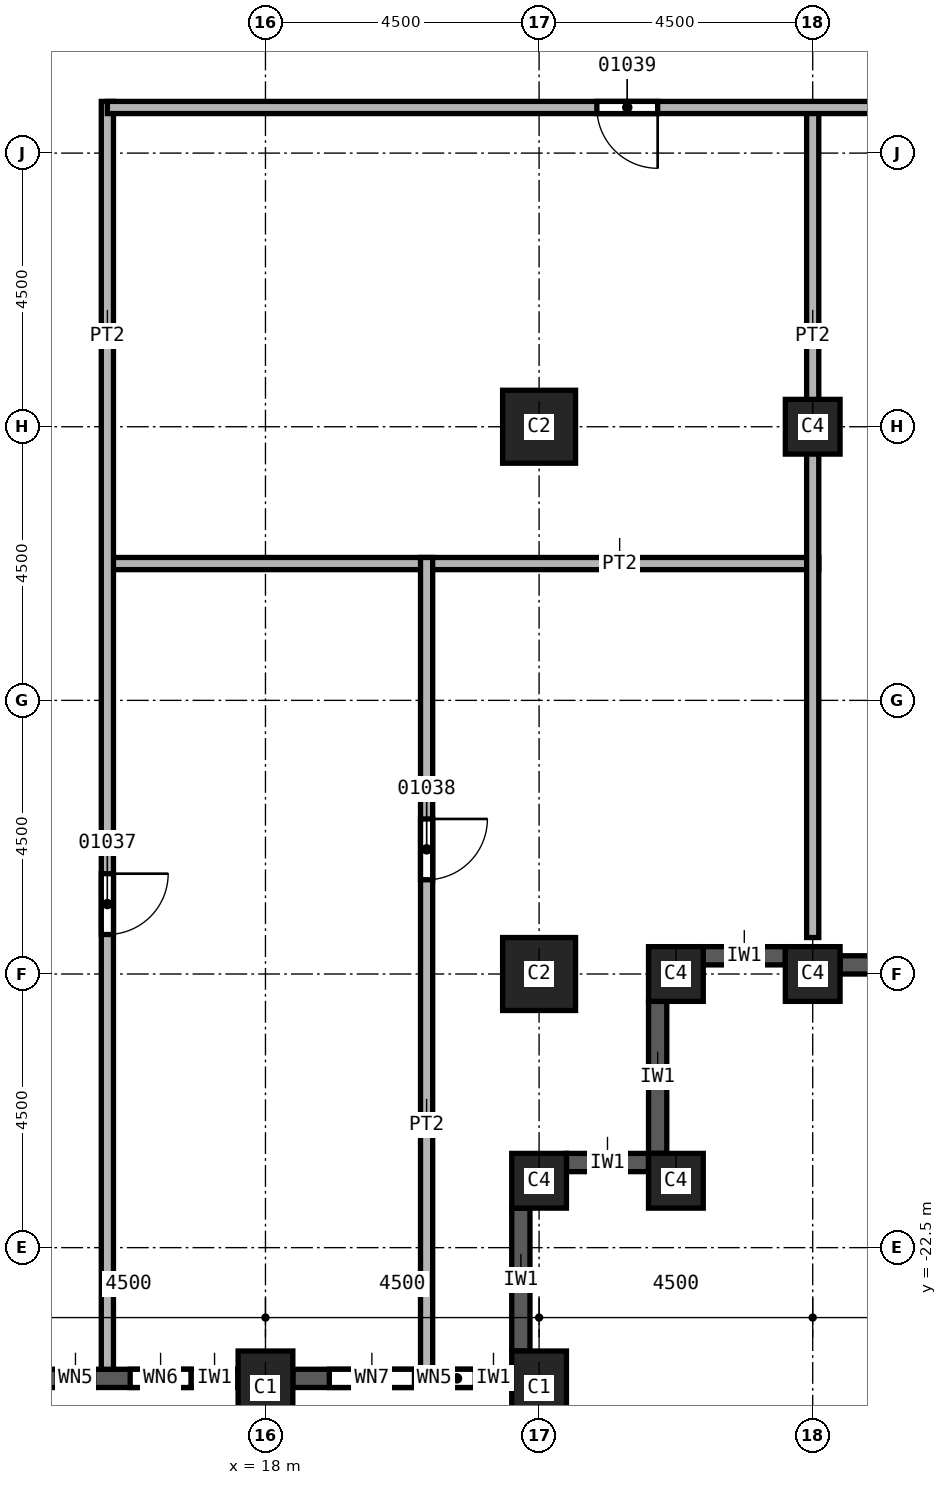
"""IFC4 building model, lengths in metres.
Left out: names, types, materials, properties, quantities, classifications, styles, units other than length and angle.
Written with IfcOpenShell. Run it as: python <this file> out.ifc"""

import sys

from ifc_helpers import new_model, si_unit, direction, frame, frame_2d, origin, origin_2d, place, context, subcontext, project, spatial, rectangle, extrude, element, fill, save


model = new_model("IFC4")
c1 = context("Model", 3, precision=1e-05, world=origin(), true_north=direction((0.0, 1.0)))
c2 = subcontext(c1, "Body", "Model", "MODEL_VIEW")
j1 = project(units=[si_unit("LENGTHUNIT", "METRE"), si_unit("PLANEANGLEUNIT", "RADIAN")], contexts=[c1])
p1 = place(None, origin())
s1 = spatial("IfcSite", under=j1, at=p1, CompositionType="ELEMENT")
p2 = place(p1, origin())
s2 = spatial("IfcBuilding", under=s1, at=p2, CompositionType="ELEMENT")
p3 = place(p2, frame((0.0, 0.0, 72.0)))
s3 = spatial("IfcBuildingStorey", under=s2, at=p3, CompositionType="ELEMENT", Elevation=72.0)
for number, where, z_axis, x_axis in (
    (1, (22.5, -9.0, 0.0), (0.0, 0.0, 1.0), (1.0, 0.0, 0.0)),
    (2, (22.5, -18.0, 0.0), (0.0, 0.0, 1.0), (1.0, 0.0, 0.0)),
):
    element("IfcColumn", number, at=place(p3, frame(where, z_axis=z_axis, x_axis=x_axis)), inside=s3, PredefinedType="COLUMN", context=c2, shape_type="SweptSolid", body=[
        extrude(rectangle(XDim=1.2, YDim=1.2, at=origin_2d()), origin(), (0.0, 0.0, 1.0), 3.7),
    ])
for number, where, z_axis, x_axis in (
    (3, (27.0, -9.0, 0.0), (0.0, 0.0, 1.0), (1.0, 0.0, 0.0)),
    (4, (27.0, -18.0, 0.0), (0.0, 0.0, 1.0), (1.0, 0.0, 0.0)),
):
    element("IfcColumn", number, at=place(p3, frame(where, z_axis=z_axis, x_axis=x_axis)), inside=s3, PredefinedType="COLUMN", context=c2, shape_type="SweptSolid", body=[
        extrude(rectangle(XDim=0.9, YDim=0.9, at=origin_2d()), origin(), (0.0, 0.0, 1.0), 3.7),
    ])
for number, where, z_axis, x_axis in (
    (5, (18.0, -24.8, 0.0), (0.0, 0.0, 1.0), (1.0, 0.0, 0.0)),
    (6, (22.5, -24.8, 0.0), (0.0, 0.0, 1.0), (1.0, 0.0, 0.0)),
):
    element("IfcColumn", number, at=place(p3, frame(where, z_axis=z_axis, x_axis=x_axis)), inside=s3, PredefinedType="COLUMN", context=c2, shape_type="SweptSolid", body=[
        extrude(rectangle(XDim=0.9, YDim=1.2, at=origin_2d()), origin(), (0.0, 0.0, 1.0), 3.7),
    ])
for number, where, z_axis, x_axis in (
    (7, (22.5, -21.4, 0.0), (0.0, 0.0, 1.0), (1.0, 0.0, 0.0)),
    (8, (24.75, -21.4, 0.0), (0.0, 0.0, 1.0), (1.0, 0.0, 0.0)),
    (9, (24.75, -18.0, 0.0), (0.0, 0.0, 1.0), (1.0, 0.0, 0.0)),
):
    element("IfcColumn", number, at=place(p3, frame(where, z_axis=z_axis, x_axis=x_axis)), inside=s3, PredefinedType="COLUMN", context=c2, shape_type="SweptSolid", body=[
        extrude(rectangle(XDim=0.9, YDim=0.9, at=origin_2d()), origin(), (0.0, 0.0, 1.0), 3.7),
    ])
p4 = place(p3, frame((13.95, -24.65, 0.0), z_axis=(0.0, 0.0, 1.0), x_axis=(1.0, 0.0, 0.0)))
e10 = element("IfcWall", 10, at=p4, inside=s3, PredefinedType="SOLIDWALL", context=c2, shape_type="SweptSolid", body=[
    extrude(rectangle(XDim=3.6, YDim=0.3, at=frame_2d((1.8, 0.0))), origin(), (0.0, 0.0, 1.0), 3.1),
])
p5 = place(p4, frame((0.625, 0.0, 0.8)))
e11 = element("IfcOpeningElement", 11, at=p5, cuts=e10, PredefinedType="OPENING", context=c2, shape_type="SweptSolid", body=[
    extrude(rectangle(XDim=0.6, YDim=1.95, at=frame_2d((0.3, 0.975))), frame((0.0, 0.15, 0.0), z_axis=(0.0, -1.0, 0.0), x_axis=(1.0, 0.0, 0.0)), (0.0, 0.0, 1.0), 0.3),
])
p6 = place(p4, frame((1.825, 0.0, 0.8)))
e12 = element("IfcOpeningElement", 12, at=p6, cuts=e10, PredefinedType="OPENING", context=c2, shape_type="SweptSolid", body=[
    extrude(rectangle(XDim=1.0, YDim=1.95, at=frame_2d((0.5, 0.975))), frame((0.0, 0.15, 0.0), z_axis=(0.0, -1.0, 0.0), x_axis=(1.0, 0.0, 0.0)), (0.0, 0.0, 1.0), 0.3),
])
p7 = place(p3, frame((18.45, -24.65, 0.0), z_axis=(0.0, 0.0, 1.0), x_axis=(1.0, 0.0, 0.0)))
e13 = element("IfcWall", 13, at=p7, inside=s3, PredefinedType="SOLIDWALL", context=c2, shape_type="SweptSolid", body=[
    extrude(rectangle(XDim=3.6, YDim=0.3, at=frame_2d((1.8, 0.0))), origin(), (0.0, 0.0, 1.0), 3.1),
])
p8 = place(p7, frame((0.6, 0.0, 0.8)))
e14 = element("IfcOpeningElement", 14, at=p8, cuts=e13, PredefinedType="OPENING", context=c2, shape_type="SweptSolid", body=[
    extrude(rectangle(XDim=1.4, YDim=1.95, at=frame_2d((0.7, 0.975))), frame((0.0, 0.15, 0.0), z_axis=(0.0, -1.0, 0.0), x_axis=(1.0, 0.0, 0.0)), (0.0, 0.0, 1.0), 0.3),
])
p9 = place(p7, frame((2.4, 0.0, 0.8)))
e15 = element("IfcOpeningElement", 15, at=p9, cuts=e13, PredefinedType="OPENING", context=c2, shape_type="SweptSolid", body=[
    extrude(rectangle(XDim=0.6, YDim=1.95, at=frame_2d((0.3, 0.975))), frame((0.0, 0.15, 0.0), z_axis=(0.0, -1.0, 0.0), x_axis=(1.0, 0.0, 0.0)), (0.0, 0.0, 1.0), 0.3),
])
p10 = place(p3, frame((22.2, -24.2, 0.0), z_axis=(0.0, 0.0, 1.0), x_axis=(0.0, 1.0, 0.0)))
e16 = element("IfcWall", 16, at=p10, inside=s3, PredefinedType="SOLIDWALL", context=c2, shape_type="SweptSolid", body=[
    extrude(rectangle(XDim=2.35, YDim=0.3, at=frame_2d((1.175, 0.0))), origin(), (0.0, 0.0, 1.0), 3.1),
])
p11 = place(p3, frame((22.95, -21.1, 0.0), z_axis=(0.0, 0.0, 1.0), x_axis=(1.0, 0.0, 0.0)))
e17 = element("IfcWall", 17, at=p11, inside=s3, PredefinedType="SOLIDWALL", context=c2, shape_type="SweptSolid", body=[
    extrude(rectangle(XDim=1.35, YDim=0.3, at=frame_2d((0.675, 0.0))), origin(), (0.0, 0.0, 1.0), 3.1),
])
p12 = place(p3, frame((24.45, -20.95, 0.0), z_axis=(0.0, 0.0, 1.0), x_axis=(0.0, 1.0, 0.0)))
e18 = element("IfcWall", 18, at=p12, inside=s3, PredefinedType="SOLIDWALL", context=c2, shape_type="SweptSolid", body=[
    extrude(rectangle(XDim=2.5, YDim=0.3, at=frame_2d((1.25, 0.0))), origin(), (0.0, 0.0, 1.0), 3.1),
])
p13 = place(p3, frame((25.2, -17.7, 0.0), z_axis=(0.0, 0.0, 1.0), x_axis=(1.0, 0.0, 0.0)))
e19 = element("IfcWall", 19, at=p13, inside=s3, PredefinedType="SOLIDWALL", context=c2, shape_type="SweptSolid", body=[
    extrude(rectangle(XDim=1.35, YDim=0.3, at=frame_2d((0.675, 0.0))), origin(), (0.0, 0.0, 1.0), 3.1),
])
p14 = place(p3, frame((27.45, -17.85, 0.0), z_axis=(0.0, 0.0, 1.0), x_axis=(1.0, 0.0, 0.0)))
e20 = element("IfcWall", 20, at=p14, inside=s3, PredefinedType="SOLIDWALL", context=c2, shape_type="SweptSolid", body=[
    extrude(rectangle(XDim=3.6, YDim=0.3, at=frame_2d((1.8, 0.0))), origin(), (0.0, 0.0, 1.0), 3.1),
])
p15 = place(p14, frame((0.6, 0.0, 0.8)))
e21 = element("IfcOpeningElement", 21, at=p15, cuts=e20, PredefinedType="OPENING", context=c2, shape_type="SweptSolid", body=[
    extrude(rectangle(XDim=2.4, YDim=1.95, at=frame_2d((1.2, 0.975))), frame((0.0, 0.15, 0.0), z_axis=(0.0, -1.0, 0.0), x_axis=(1.0, 0.0, 0.0)), (0.0, 0.0, 1.0), 0.3),
])
p16 = place(p3, frame((15.4, -11.25, 0.0), z_axis=(0.0, 0.0, 1.0), x_axis=(1.0, 0.0, 0.0)))
e22 = element("IfcWall", 22, at=p16, inside=s3, PredefinedType="PARTITIONING", context=c2, shape_type="SweptSolid", body=[
    extrude(rectangle(XDim=11.7, YDim=0.2, at=frame_2d((5.85, 0.0))), origin(), (0.0, 0.0, 1.0), 3.7),
])
p17 = place(p3, frame((15.4, -3.65, 0.0), z_axis=(0.0, 0.0, 1.0), x_axis=(0.0, -1.0, 0.0)))
e23 = element("IfcWall", 23, at=p17, inside=s3, PredefinedType="PARTITIONING", context=c2, shape_type="SweptSolid", body=[
    extrude(rectangle(XDim=20.85, YDim=0.2, at=frame_2d((10.425, 0.0))), origin(), (0.0, 0.0, 1.0), 3.7),
])
p18 = place(p17, frame((12.7, 0.0, 0.0)))
e24 = element("IfcOpeningElement", 24, at=p18, cuts=e23, PredefinedType="OPENING", context=c2, shape_type="SweptSolid", body=[
    extrude(rectangle(XDim=1.0, YDim=2.1, at=frame_2d((0.5, 1.05))), frame((0.0, 0.1, 0.0), z_axis=(0.0, -1.0, 0.0), x_axis=(1.0, 0.0, 0.0)), (0.0, 0.0, 1.0), 0.2),
])
p19 = place(p3, frame((20.65, -11.15, 0.0), z_axis=(0.0, 0.0, 1.0), x_axis=(0.0, -1.0, 0.0)))
e25 = element("IfcWall", 25, at=p19, inside=s3, PredefinedType="PARTITIONING", context=c2, shape_type="SweptSolid", body=[
    extrude(rectangle(XDim=13.35, YDim=0.2, at=frame_2d((6.675, 0.0))), origin(), (0.0, 0.0, 1.0), 3.7),
])
p20 = place(p19, frame((4.3, 0.0, 0.0)))
e26 = element("IfcOpeningElement", 26, at=p20, cuts=e25, PredefinedType="OPENING", context=c2, shape_type="SweptSolid", body=[
    extrude(rectangle(XDim=1.0, YDim=2.1, at=frame_2d((0.5, 1.05))), frame((0.0, 0.1, 0.0), z_axis=(0.0, -1.0, 0.0), x_axis=(1.0, 0.0, 0.0)), (0.0, 0.0, 1.0), 0.2),
])
p21 = place(p3, frame((27.0, -3.75, 0.0), z_axis=(0.0, 0.0, 1.0), x_axis=(0.0, -1.0, 0.0)))
e27 = element("IfcWall", 27, at=p21, inside=s3, PredefinedType="PARTITIONING", context=c2, shape_type="SweptSolid", body=[
    extrude(rectangle(XDim=13.65, YDim=0.2, at=frame_2d((6.825, 0.0))), origin(), (0.0, 0.0, 1.0), 3.7),
])
p22 = place(p3, frame((33.85, -3.75, 0.0), z_axis=(0.0, 0.0, 1.0), x_axis=(-1.0, 0.0, 0.0)))
e28 = element("IfcWall", 28, at=p22, inside=s3, PredefinedType="PARTITIONING", context=c2, shape_type="SweptSolid", body=[
    extrude(rectangle(XDim=18.45, YDim=0.2, at=frame_2d((9.225, 0.0))), origin(), (0.0, 0.0, 1.0), 3.7),
])
p23 = place(p22, frame((9.4, 0.0, 0.0)))
e29 = element("IfcOpeningElement", 29, at=p23, cuts=e28, PredefinedType="OPENING", context=c2, shape_type="SweptSolid", body=[
    extrude(rectangle(XDim=1.0, YDim=2.1, at=frame_2d((0.5, 1.05))), frame((0.0, 0.1, 0.0), z_axis=(0.0, -1.0, 0.0), x_axis=(1.0, 0.0, 0.0)), (0.0, 0.0, 1.0), 0.2),
])
p24 = place(p18, origin())
e30 = element("IfcDoor", 30, at=p24, inside=s3, OperationType="SINGLE_SWING_RIGHT", PredefinedType="DOOR", context=c2, shape_type="SweptSolid", body=[
    extrude(rectangle(XDim=1.0, YDim=2.1, at=frame_2d((0.5, 1.05))), frame((0.0, 0.025, 0.0), z_axis=(0.0, -1.0, 0.0), x_axis=(1.0, 0.0, 0.0)), (0.0, 0.0, 1.0), 0.05),
])
fill(e24, e30)
p25 = place(p20, origin())
e31 = element("IfcDoor", 31, at=p25, inside=s3, OperationType="SINGLE_SWING_LEFT", PredefinedType="DOOR", context=c2, shape_type="SweptSolid", body=[
    extrude(rectangle(XDim=1.0, YDim=2.1, at=frame_2d((0.5, 1.05))), frame((0.0, 0.025, 0.0), z_axis=(0.0, -1.0, 0.0), x_axis=(1.0, 0.0, 0.0)), (0.0, 0.0, 1.0), 0.05),
])
fill(e26, e31)
p26 = place(p23, origin())
e32 = element("IfcDoor", 32, at=p26, inside=s3, OperationType="SINGLE_SWING_RIGHT", PredefinedType="DOOR", context=c2, shape_type="SweptSolid", body=[
    extrude(rectangle(XDim=1.0, YDim=2.1, at=frame_2d((0.5, 1.05))), frame((0.0, 0.025, 0.0), z_axis=(0.0, -1.0, 0.0), x_axis=(1.0, 0.0, 0.0)), (0.0, 0.0, 1.0), 0.05),
])
fill(e29, e32)
p27 = place(p5, origin())
e33 = element("IfcWindow", 33, at=p27, inside=s3, PartitioningType="SINGLE_PANEL", PredefinedType="WINDOW", context=c2, shape_type="SweptSolid", body=[
    extrude(rectangle(XDim=0.6, YDim=1.95, at=frame_2d((0.3, 0.975))), frame((0.0, 0.03, 0.0), z_axis=(0.0, -1.0, 0.0), x_axis=(1.0, 0.0, 0.0)), (0.0, 0.0, 1.0), 0.06),
])
fill(e11, e33)
p28 = place(p6, origin())
e34 = element("IfcWindow", 34, at=p28, inside=s3, PartitioningType="SINGLE_PANEL", PredefinedType="WINDOW", context=c2, shape_type="SweptSolid", body=[
    extrude(rectangle(XDim=1.0, YDim=1.95, at=frame_2d((0.5, 0.975))), frame((0.0, 0.03, 0.0), z_axis=(0.0, -1.0, 0.0), x_axis=(1.0, 0.0, 0.0)), (0.0, 0.0, 1.0), 0.06),
])
fill(e12, e34)
p29 = place(p8, origin())
e35 = element("IfcWindow", 35, at=p29, inside=s3, PartitioningType="SINGLE_PANEL", PredefinedType="WINDOW", context=c2, shape_type="SweptSolid", body=[
    extrude(rectangle(XDim=1.4, YDim=1.95, at=frame_2d((0.7, 0.975))), frame((0.0, 0.03, 0.0), z_axis=(0.0, -1.0, 0.0), x_axis=(1.0, 0.0, 0.0)), (0.0, 0.0, 1.0), 0.06),
])
fill(e14, e35)
p30 = place(p9, origin())
e36 = element("IfcWindow", 36, at=p30, inside=s3, PartitioningType="SINGLE_PANEL", PredefinedType="WINDOW", context=c2, shape_type="SweptSolid", body=[
    extrude(rectangle(XDim=0.6, YDim=1.95, at=frame_2d((0.3, 0.975))), frame((0.0, 0.03, 0.0), z_axis=(0.0, -1.0, 0.0), x_axis=(1.0, 0.0, 0.0)), (0.0, 0.0, 1.0), 0.06),
])
fill(e15, e36)
save(model, sys.argv[1])
